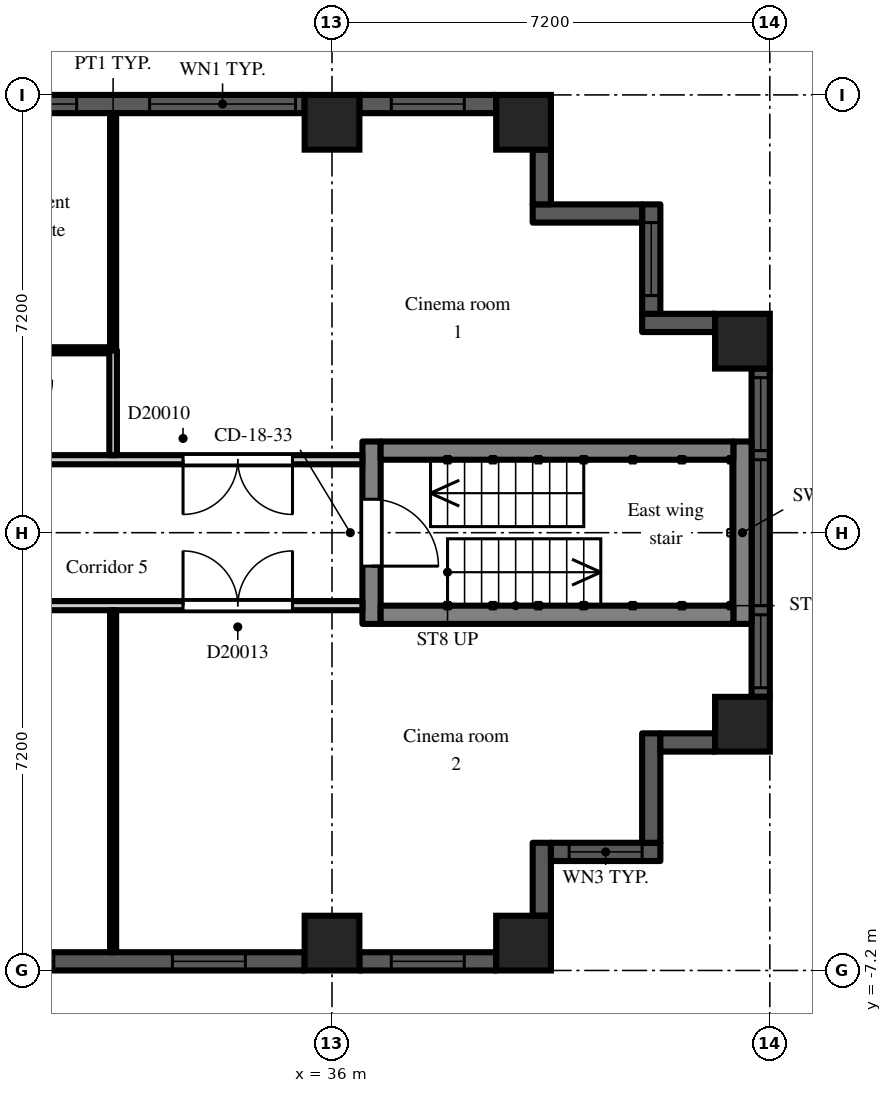
"""IFC4 building model, lengths in metres.
Left out: names, types, materials, properties, quantities, classifications, styles, units other than length and angle.
Written with IfcOpenShell. Run it as: python <this file> out.ifc"""

import sys

from ifc_helpers import new_model, si_unit, direction, frame, frame_2d, origin, origin_2d, place, context, subcontext, project, spatial, rectangle, extrude, element, fill, save


model = new_model("IFC4")
c1 = context("Model", 3, precision=1e-05, world=origin(), true_north=direction((0.0, 1.0)))
c2 = subcontext(c1, "Body", "Model", "MODEL_VIEW")
j1 = project(units=[si_unit("LENGTHUNIT", "METRE"), si_unit("PLANEANGLEUNIT", "RADIAN")], contexts=[c1])
p1 = place(None, origin())
s1 = spatial("IfcSite", under=j1, at=p1, CompositionType="ELEMENT")
p2 = place(p1, origin())
s2 = spatial("IfcBuilding", under=s1, at=p2, CompositionType="ELEMENT")
p3 = place(p2, frame((0.0, 0.0, 138.3)))
s3 = spatial("IfcBuildingStorey", under=s2, at=p3, CompositionType="ELEMENT", Elevation=138.3)
for number, where, z_axis, x_axis in (
    (1, (36.0, -6.75, 0.0), (0.0, 0.0, 1.0), (1.0, 0.0, 0.0)),
    (2, (36.0, 6.75, 0.0), (0.0, 0.0, 1.0), (1.0, 0.0, 0.0)),
    (3, (39.15, -6.75, 0.0), (0.0, 0.0, 1.0), (1.0, 0.0, 0.0)),
    (4, (39.15, 6.75, 0.0), (0.0, 0.0, 1.0), (1.0, 0.0, 0.0)),
    (5, (42.75, -3.15, 0.0), (0.0, 0.0, 1.0), (1.0, 0.0, 0.0)),
    (6, (42.75, 3.15, 0.0), (0.0, 0.0, 1.0), (1.0, 0.0, 0.0)),
):
    element("IfcColumn", number, at=place(p3, frame(where, z_axis=z_axis, x_axis=x_axis)), inside=s3, PredefinedType="COLUMN", context=c2, shape_type="SweptSolid", body=[
        extrude(rectangle(XDim=0.9, YDim=0.9, at=origin_2d()), origin(), (0.0, 0.0, 1.0), 3.0),
    ])
p4 = place(p3, frame((29.25, -7.05, 0.0), z_axis=(0.0, 0.0, 1.0), x_axis=(1.0, 0.0, 0.0)))
e7 = element("IfcWall", 7, at=p4, inside=s3, PredefinedType="SOLIDWALL", context=c2, shape_type="SweptSolid", body=[
    extrude(rectangle(XDim=6.3, YDim=0.3, at=frame_2d((3.15, 0.0))), origin(), (0.0, 0.0, 1.0), 2.2),
])
p5 = place(p4, frame((0.975, 0.0, 0.2)))
e8 = element("IfcOpeningElement", 8, at=p5, cuts=e7, PredefinedType="OPENING", context=c2, shape_type="SweptSolid", body=[
    extrude(rectangle(XDim=1.2, YDim=1.85, at=frame_2d((0.6, 0.925))), frame((0.0, 0.16, 0.0), z_axis=(0.0, -1.0, 0.0), x_axis=(1.0, 0.0, 0.0)), (0.0, 0.0, 1.0), 0.32),
])
p6 = place(p4, frame((4.125, 0.0, 0.2)))
e9 = element("IfcOpeningElement", 9, at=p6, cuts=e7, PredefinedType="OPENING", context=c2, shape_type="SweptSolid", body=[
    extrude(rectangle(XDim=1.2, YDim=1.85, at=frame_2d((0.6, 0.925))), frame((0.0, 0.16, 0.0), z_axis=(0.0, -1.0, 0.0), x_axis=(1.0, 0.0, 0.0)), (0.0, 0.0, 1.0), 0.32),
])
p7 = place(p3, frame((36.45, -7.05, 0.0), z_axis=(0.0, 0.0, 1.0), x_axis=(1.0, 0.0, 0.0)))
e10 = element("IfcWall", 10, at=p7, inside=s3, PredefinedType="SOLIDWALL", context=c2, shape_type="SweptSolid", body=[
    extrude(rectangle(XDim=2.25, YDim=0.3, at=frame_2d((1.125, 0.0))), origin(), (0.0, 0.0, 1.0), 2.2),
])
p8 = place(p7, frame((0.525, 0.0, 0.2)))
e11 = element("IfcOpeningElement", 11, at=p8, cuts=e10, PredefinedType="OPENING", context=c2, shape_type="SweptSolid", body=[
    extrude(rectangle(XDim=1.2, YDim=1.85, at=frame_2d((0.6, 0.925))), frame((0.0, 0.16, 0.0), z_axis=(0.0, -1.0, 0.0), x_axis=(1.0, 0.0, 0.0)), (0.0, 0.0, 1.0), 0.32),
])
p9 = place(p3, frame((39.45, -6.3, 0.0), z_axis=(0.0, 0.0, 1.0), x_axis=(0.0, 1.0, 0.0)))
e12 = element("IfcWall", 12, at=p9, inside=s3, PredefinedType="SOLIDWALL", context=c2, shape_type="SweptSolid", body=[
    extrude(rectangle(XDim=1.2, YDim=0.3, at=frame_2d((0.6, 0.0))), origin(), (0.0, 0.0, 1.0), 2.6),
])
p10 = place(p3, frame((39.6, -5.25, 0.0), z_axis=(0.0, 0.0, 1.0), x_axis=(1.0, 0.0, 0.0)))
e13 = element("IfcWall", 13, at=p10, inside=s3, PredefinedType="SOLIDWALL", context=c2, shape_type="SweptSolid", body=[
    extrude(rectangle(XDim=1.8, YDim=0.3, at=frame_2d((0.9, 0.0))), origin(), (0.0, 0.0, 1.0), 2.6),
])
p11 = place(p10, frame((0.3, 0.0, 0.2)))
e14 = element("IfcOpeningElement", 14, at=p11, cuts=e13, PredefinedType="OPENING", context=c2, shape_type="SweptSolid", body=[
    extrude(rectangle(XDim=1.2, YDim=1.85, at=frame_2d((0.6, 0.925))), frame((0.0, 0.16, 0.0), z_axis=(0.0, -1.0, 0.0), x_axis=(1.0, 0.0, 0.0)), (0.0, 0.0, 1.0), 0.32),
])
p12 = place(p3, frame((41.25, -5.1, 0.0), z_axis=(0.0, 0.0, 1.0), x_axis=(0.0, 1.0, 0.0)))
e15 = element("IfcWall", 15, at=p12, inside=s3, PredefinedType="SOLIDWALL", context=c2, shape_type="SweptSolid", body=[
    extrude(rectangle(XDim=1.8, YDim=0.3, at=frame_2d((0.9, 0.0))), origin(), (0.0, 0.0, 1.0), 2.6),
])
p13 = place(p3, frame((41.4, -3.45, 0.0), z_axis=(0.0, 0.0, 1.0), x_axis=(1.0, 0.0, 0.0)))
e16 = element("IfcWall", 16, at=p13, inside=s3, PredefinedType="SOLIDWALL", context=c2, shape_type="SweptSolid", body=[
    extrude(rectangle(XDim=0.9, YDim=0.3, at=frame_2d((0.45, 0.0))), origin(), (0.0, 0.0, 1.0), 2.6),
])
p14 = place(p3, frame((43.05, -2.7, 0.0), z_axis=(0.0, 0.0, 1.0), x_axis=(0.0, 1.0, 0.0)))
e17 = element("IfcWall", 17, at=p14, inside=s3, PredefinedType="SOLIDWALL", context=c2, shape_type="SweptSolid", body=[
    extrude(rectangle(XDim=5.4, YDim=0.3, at=frame_2d((2.7, 0.0))), origin(), (0.0, 0.0, 1.0), 2.2),
])
p15 = place(p14, frame((1.5, 0.0, 0.2)))
e18 = element("IfcOpeningElement", 18, at=p15, cuts=e17, PredefinedType="OPENING", context=c2, shape_type="SweptSolid", body=[
    extrude(rectangle(XDim=2.4, YDim=1.85, at=frame_2d((1.2, 0.925))), frame((0.0, 0.16, 0.0), z_axis=(0.0, -1.0, 0.0), x_axis=(1.0, 0.0, 0.0)), (0.0, 0.0, 1.0), 0.32),
])
p16 = place(p14, frame((0.15, 0.0, 0.2)))
e19 = element("IfcOpeningElement", 19, at=p16, cuts=e17, PredefinedType="OPENING", context=c2, shape_type="SweptSolid", body=[
    extrude(rectangle(XDim=1.2, YDim=1.85, at=frame_2d((0.6, 0.925))), frame((0.0, 0.16, 0.0), z_axis=(0.0, -1.0, 0.0), x_axis=(1.0, 0.0, 0.0)), (0.0, 0.0, 1.0), 0.32),
])
p17 = place(p14, frame((4.05, 0.0, 0.2)))
e20 = element("IfcOpeningElement", 20, at=p17, cuts=e17, PredefinedType="OPENING", context=c2, shape_type="SweptSolid", body=[
    extrude(rectangle(XDim=1.2, YDim=1.85, at=frame_2d((0.6, 0.925))), frame((0.0, 0.16, 0.0), z_axis=(0.0, -1.0, 0.0), x_axis=(1.0, 0.0, 0.0)), (0.0, 0.0, 1.0), 0.32),
])
p18 = place(p3, frame((42.3, 3.45, 0.0), z_axis=(0.0, 0.0, 1.0), x_axis=(-1.0, 0.0, 0.0)))
e21 = element("IfcWall", 21, at=p18, inside=s3, PredefinedType="SOLIDWALL", context=c2, shape_type="SweptSolid", body=[
    extrude(rectangle(XDim=1.2, YDim=0.3, at=frame_2d((0.6, 0.0))), origin(), (0.0, 0.0, 1.0), 2.6),
])
p19 = place(p3, frame((41.25, 3.6, 0.0), z_axis=(0.0, 0.0, 1.0), x_axis=(0.0, 1.0, 0.0)))
e22 = element("IfcWall", 22, at=p19, inside=s3, PredefinedType="SOLIDWALL", context=c2, shape_type="SweptSolid", body=[
    extrude(rectangle(XDim=1.8, YDim=0.3, at=frame_2d((0.9, 0.0))), origin(), (0.0, 0.0, 1.0), 2.6),
])
p20 = place(p19, frame((0.3, 0.0, 0.2)))
e23 = element("IfcOpeningElement", 23, at=p20, cuts=e22, PredefinedType="OPENING", context=c2, shape_type="SweptSolid", body=[
    extrude(rectangle(XDim=1.2, YDim=1.85, at=frame_2d((0.6, 0.925))), frame((0.0, 0.16, 0.0), z_axis=(0.0, -1.0, 0.0), x_axis=(1.0, 0.0, 0.0)), (0.0, 0.0, 1.0), 0.32),
])
p21 = place(p3, frame((41.1, 5.25, 0.0), z_axis=(0.0, 0.0, 1.0), x_axis=(-1.0, 0.0, 0.0)))
e24 = element("IfcWall", 24, at=p21, inside=s3, PredefinedType="SOLIDWALL", context=c2, shape_type="SweptSolid", body=[
    extrude(rectangle(XDim=1.8, YDim=0.3, at=frame_2d((0.9, 0.0))), origin(), (0.0, 0.0, 1.0), 2.6),
])
p22 = place(p3, frame((39.45, 5.4, 0.0), z_axis=(0.0, 0.0, 1.0), x_axis=(0.0, 1.0, 0.0)))
e25 = element("IfcWall", 25, at=p22, inside=s3, PredefinedType="SOLIDWALL", context=c2, shape_type="SweptSolid", body=[
    extrude(rectangle(XDim=0.9, YDim=0.3, at=frame_2d((0.45, 0.0))), origin(), (0.0, 0.0, 1.0), 2.6),
])
p23 = place(p3, frame((38.7, 7.05, 0.0), z_axis=(0.0, 0.0, 1.0), x_axis=(-1.0, 0.0, 0.0)))
e26 = element("IfcWall", 26, at=p23, inside=s3, PredefinedType="SOLIDWALL", context=c2, shape_type="SweptSolid", body=[
    extrude(rectangle(XDim=2.25, YDim=0.3, at=frame_2d((1.125, 0.0))), origin(), (0.0, 0.0, 1.0), 2.2),
])
p24 = place(p23, frame((0.525, 0.0, 0.2)))
e27 = element("IfcOpeningElement", 27, at=p24, cuts=e26, PredefinedType="OPENING", context=c2, shape_type="SweptSolid", body=[
    extrude(rectangle(XDim=1.2, YDim=1.85, at=frame_2d((0.6, 0.925))), frame((0.0, 0.16, 0.0), z_axis=(0.0, -1.0, 0.0), x_axis=(1.0, 0.0, 0.0)), (0.0, 0.0, 1.0), 0.32),
])
p25 = place(p3, frame((35.55, 7.05, 0.0), z_axis=(0.0, 0.0, 1.0), x_axis=(-1.0, 0.0, 0.0)))
e28 = element("IfcWall", 28, at=p25, inside=s3, PredefinedType="SOLIDWALL", context=c2, shape_type="SweptSolid", body=[
    extrude(rectangle(XDim=6.3, YDim=0.3, at=frame_2d((3.15, 0.0))), origin(), (0.0, 0.0, 1.0), 2.2),
])
p26 = place(p25, frame((0.15, 0.0, 0.2)))
e29 = element("IfcOpeningElement", 29, at=p26, cuts=e28, PredefinedType="OPENING", context=c2, shape_type="SweptSolid", body=[
    extrude(rectangle(XDim=2.4, YDim=1.85, at=frame_2d((1.2, 0.925))), frame((0.0, 0.16, 0.0), z_axis=(0.0, -1.0, 0.0), x_axis=(1.0, 0.0, 0.0)), (0.0, 0.0, 1.0), 0.32),
])
p27 = place(p25, frame((3.75, 0.0, 0.2)))
e30 = element("IfcOpeningElement", 30, at=p27, cuts=e28, PredefinedType="OPENING", context=c2, shape_type="SweptSolid", body=[
    extrude(rectangle(XDim=2.4, YDim=1.85, at=frame_2d((1.2, 0.925))), frame((0.0, 0.16, 0.0), z_axis=(0.0, -1.0, 0.0), x_axis=(1.0, 0.0, 0.0)), (0.0, 0.0, 1.0), 0.32),
])
p28 = place(p3, frame((36.65, -1.5, 0.0), z_axis=(0.0, 0.0, 1.0), x_axis=(0.0, 1.0, 0.0)))
e31 = element("IfcWall", 31, at=p28, inside=s3, PredefinedType="SHEAR", context=c2, shape_type="SweptSolid", body=[
    extrude(rectangle(XDim=3.0, YDim=0.3, at=frame_2d((1.5, 0.0))), origin(), (0.0, 0.0, 1.0), 2.6),
])
p29 = place(p28, frame((0.95, 0.0, 0.0)))
e32 = element("IfcOpeningElement", 32, at=p29, cuts=e31, PredefinedType="OPENING", context=c2, shape_type="SweptSolid", body=[
    extrude(rectangle(XDim=1.1, YDim=2.1, at=frame_2d((0.55, 1.05))), frame((0.0, 0.16, 0.0), z_axis=(0.0, -1.0, 0.0), x_axis=(1.0, 0.0, 0.0)), (0.0, 0.0, 1.0), 0.32),
])
p30 = place(p3, frame((42.75, -1.5, 0.0), z_axis=(0.0, 0.0, 1.0), x_axis=(0.0, 1.0, 0.0)))
e33 = element("IfcWall", 33, at=p30, inside=s3, PredefinedType="SHEAR", context=c2, shape_type="SweptSolid", body=[
    extrude(rectangle(XDim=3.0, YDim=0.3, at=frame_2d((1.5, 0.0))), origin(), (0.0, 0.0, 1.0), 2.6),
])
for number, where, z_axis, x_axis in (
    (34, (36.8, -1.35, 0.0), (0.0, 0.0, 1.0), (1.0, 0.0, 0.0)),
    (35, (36.8, 1.35, 0.0), (0.0, 0.0, 1.0), (1.0, 0.0, 0.0)),
):
    element("IfcWall", number, at=place(p3, frame(where, z_axis=z_axis, x_axis=x_axis)), inside=s3, PredefinedType="SHEAR", context=c2, shape_type="SweptSolid", body=[
        extrude(rectangle(XDim=5.8, YDim=0.3, at=frame_2d((2.9, 0.0))), origin(), (0.0, 0.0, 1.0), 2.6),
    ])
p31 = place(p3, frame((21.6, -1.2, 0.0), z_axis=(0.0, 0.0, 1.0), x_axis=(1.0, 0.0, 0.0)))
e36 = element("IfcWall", 36, at=p31, inside=s3, PredefinedType="PARTITIONING", context=c2, shape_type="SweptSolid", body=[
    extrude(rectangle(XDim=14.9, YDim=0.15, at=frame_2d((7.45, 0.0))), origin(), (0.0, 0.0, 1.0), 2.6),
])
p32 = place(p31, frame((2.7, 0.0, 0.0)))
e37 = element("IfcOpeningElement", 37, at=p32, cuts=e36, PredefinedType="OPENING", context=c2, shape_type="SweptSolid", body=[
    extrude(rectangle(XDim=1.8, YDim=2.1, at=frame_2d((0.9, 1.05))), frame((0.0, 0.085, 0.0), z_axis=(0.0, -1.0, 0.0), x_axis=(1.0, 0.0, 0.0)), (0.0, 0.0, 1.0), 0.17),
])
p33 = place(p31, frame((8.55, 0.0, 0.0)))
e38 = element("IfcOpeningElement", 38, at=p33, cuts=e36, PredefinedType="OPENING", context=c2, shape_type="SweptSolid", body=[
    extrude(rectangle(XDim=0.9, YDim=2.1, at=frame_2d((0.45, 1.05))), frame((0.0, 0.085, 0.0), z_axis=(0.0, -1.0, 0.0), x_axis=(1.0, 0.0, 0.0)), (0.0, 0.0, 1.0), 0.17),
])
p34 = place(p31, frame((11.95, 0.0, 0.0)))
e39 = element("IfcOpeningElement", 39, at=p34, cuts=e36, PredefinedType="OPENING", context=c2, shape_type="SweptSolid", body=[
    extrude(rectangle(XDim=1.8, YDim=2.1, at=frame_2d((0.9, 1.05))), frame((0.0, 0.085, 0.0), z_axis=(0.0, -1.0, 0.0), x_axis=(1.0, 0.0, 0.0)), (0.0, 0.0, 1.0), 0.17),
])
p35 = place(p3, frame((21.6, 1.2, 0.0), z_axis=(0.0, 0.0, 1.0), x_axis=(1.0, 0.0, 0.0)))
e40 = element("IfcWall", 40, at=p35, inside=s3, PredefinedType="PARTITIONING", context=c2, shape_type="SweptSolid", body=[
    extrude(rectangle(XDim=14.9, YDim=0.15, at=frame_2d((7.45, 0.0))), origin(), (0.0, 0.0, 1.0), 2.6),
])
p36 = place(p35, frame((0.45, 0.0, 0.0)))
e41 = element("IfcOpeningElement", 41, at=p36, cuts=e40, PredefinedType="OPENING", context=c2, shape_type="SweptSolid", body=[
    extrude(rectangle(XDim=0.9, YDim=2.1, at=frame_2d((0.45, 1.05))), frame((0.0, 0.085, 0.0), z_axis=(0.0, -1.0, 0.0), x_axis=(1.0, 0.0, 0.0)), (0.0, 0.0, 1.0), 0.17),
])
p37 = place(p35, frame((2.25, 0.0, 0.0)))
e42 = element("IfcOpeningElement", 42, at=p37, cuts=e40, PredefinedType="OPENING", context=c2, shape_type="SweptSolid", body=[
    extrude(rectangle(XDim=0.9, YDim=2.1, at=frame_2d((0.45, 1.05))), frame((0.0, 0.085, 0.0), z_axis=(0.0, -1.0, 0.0), x_axis=(1.0, 0.0, 0.0)), (0.0, 0.0, 1.0), 0.17),
])
p38 = place(p35, frame((4.95, 0.0, 0.0)))
e43 = element("IfcOpeningElement", 43, at=p38, cuts=e40, PredefinedType="OPENING", context=c2, shape_type="SweptSolid", body=[
    extrude(rectangle(XDim=0.9, YDim=2.1, at=frame_2d((0.45, 1.05))), frame((0.0, 0.085, 0.0), z_axis=(0.0, -1.0, 0.0), x_axis=(1.0, 0.0, 0.0)), (0.0, 0.0, 1.0), 0.17),
])
p39 = place(p35, frame((7.8, 0.0, 0.0)))
e44 = element("IfcOpeningElement", 44, at=p39, cuts=e40, PredefinedType="OPENING", context=c2, shape_type="SweptSolid", body=[
    extrude(rectangle(XDim=1.0, YDim=2.1, at=frame_2d((0.5, 1.05))), frame((0.0, 0.085, 0.0), z_axis=(0.0, -1.0, 0.0), x_axis=(1.0, 0.0, 0.0)), (0.0, 0.0, 1.0), 0.17),
])
p40 = place(p35, frame((11.95, 0.0, 0.0)))
e45 = element("IfcOpeningElement", 45, at=p40, cuts=e40, PredefinedType="OPENING", context=c2, shape_type="SweptSolid", body=[
    extrude(rectangle(XDim=1.8, YDim=2.1, at=frame_2d((0.9, 1.05))), frame((0.0, 0.085, 0.0), z_axis=(0.0, -1.0, 0.0), x_axis=(1.0, 0.0, 0.0)), (0.0, 0.0, 1.0), 0.17),
])
p41 = place(p3, frame((30.65, 3.0, 0.0), z_axis=(0.0, 0.0, 1.0), x_axis=(1.0, 0.0, 0.0)))
e46 = element("IfcWall", 46, at=p41, inside=s3, PredefinedType="PARTITIONING", context=c2, shape_type="SweptSolid", body=[
    extrude(rectangle(XDim=1.688, YDim=0.1, at=frame_2d((0.844, 0.0))), origin(), (0.0, 0.0, 1.0), 2.6),
])
p42 = place(p3, frame((32.4, -6.9, 0.0), z_axis=(0.0, 0.0, 1.0), x_axis=(0.0, 1.0, 0.0)))
e47 = element("IfcWall", 47, at=p42, inside=s3, PredefinedType="PARTITIONING", context=c2, shape_type="SweptSolid", body=[
    extrude(rectangle(XDim=5.625, YDim=0.1, at=frame_2d((2.812, 0.0))), origin(), (0.0, 0.0, 1.0), 2.6),
])
p43 = place(p3, frame((32.4, 1.275, 0.0), z_axis=(0.0, 0.0, 1.0), x_axis=(0.0, 1.0, 0.0)))
e48 = element("IfcWall", 48, at=p43, inside=s3, PredefinedType="PARTITIONING", context=c2, shape_type="SweptSolid", body=[
    extrude(rectangle(XDim=1.725, YDim=0.125, at=frame_2d((0.863, 0.0))), origin(), (0.0, 0.0, 1.0), 2.6),
])
p44 = place(p3, frame((32.4, 3.0, 0.0), z_axis=(0.0, 0.0, 1.0), x_axis=(0.0, 1.0, 0.0)))
e49 = element("IfcWall", 49, at=p44, inside=s3, PredefinedType="PARTITIONING", context=c2, shape_type="SweptSolid", body=[
    extrude(rectangle(XDim=3.9, YDim=0.1, at=frame_2d((1.95, 0.0))), origin(), (0.0, 0.0, 1.0), 2.6),
])
p45 = place(p5, origin())
e50 = element("IfcWindow", 50, at=p45, inside=s3, PartitioningType="SINGLE_PANEL", PredefinedType="WINDOW", context=c2, shape_type="SweptSolid", body=[
    extrude(rectangle(XDim=1.2, YDim=1.85, at=frame_2d((0.6, 0.925))), frame((0.0, 0.03, 0.0), z_axis=(0.0, -1.0, 0.0), x_axis=(1.0, 0.0, 0.0)), (0.0, 0.0, 1.0), 0.06),
])
fill(e8, e50)
p46 = place(p6, origin())
e51 = element("IfcWindow", 51, at=p46, inside=s3, PartitioningType="SINGLE_PANEL", PredefinedType="WINDOW", context=c2, shape_type="SweptSolid", body=[
    extrude(rectangle(XDim=1.2, YDim=1.85, at=frame_2d((0.6, 0.925))), frame((0.0, 0.03, 0.0), z_axis=(0.0, -1.0, 0.0), x_axis=(1.0, 0.0, 0.0)), (0.0, 0.0, 1.0), 0.06),
])
fill(e9, e51)
p47 = place(p8, origin())
e52 = element("IfcWindow", 52, at=p47, inside=s3, PartitioningType="SINGLE_PANEL", PredefinedType="WINDOW", context=c2, shape_type="SweptSolid", body=[
    extrude(rectangle(XDim=1.2, YDim=1.85, at=frame_2d((0.6, 0.925))), frame((0.0, 0.03, 0.0), z_axis=(0.0, -1.0, 0.0), x_axis=(1.0, 0.0, 0.0)), (0.0, 0.0, 1.0), 0.06),
])
fill(e11, e52)
p48 = place(p11, origin())
e53 = element("IfcWindow", 53, at=p48, inside=s3, PartitioningType="SINGLE_PANEL", PredefinedType="WINDOW", context=c2, shape_type="SweptSolid", body=[
    extrude(rectangle(XDim=1.2, YDim=1.85, at=frame_2d((0.6, 0.925))), frame((0.0, 0.03, 0.0), z_axis=(0.0, -1.0, 0.0), x_axis=(1.0, 0.0, 0.0)), (0.0, 0.0, 1.0), 0.06),
])
fill(e14, e53)
p49 = place(p15, origin())
e54 = element("IfcWindow", 54, at=p49, inside=s3, PartitioningType="SINGLE_PANEL", PredefinedType="WINDOW", context=c2, shape_type="SweptSolid", body=[
    extrude(rectangle(XDim=2.4, YDim=1.85, at=frame_2d((1.2, 0.925))), frame((0.0, 0.03, 0.0), z_axis=(0.0, -1.0, 0.0), x_axis=(1.0, 0.0, 0.0)), (0.0, 0.0, 1.0), 0.06),
])
fill(e18, e54)
p50 = place(p16, origin())
e55 = element("IfcWindow", 55, at=p50, inside=s3, PartitioningType="SINGLE_PANEL", PredefinedType="WINDOW", context=c2, shape_type="SweptSolid", body=[
    extrude(rectangle(XDim=1.2, YDim=1.85, at=frame_2d((0.6, 0.925))), frame((0.0, 0.03, 0.0), z_axis=(0.0, -1.0, 0.0), x_axis=(1.0, 0.0, 0.0)), (0.0, 0.0, 1.0), 0.06),
])
fill(e19, e55)
p51 = place(p17, origin())
e56 = element("IfcWindow", 56, at=p51, inside=s3, PartitioningType="SINGLE_PANEL", PredefinedType="WINDOW", context=c2, shape_type="SweptSolid", body=[
    extrude(rectangle(XDim=1.2, YDim=1.85, at=frame_2d((0.6, 0.925))), frame((0.0, 0.03, 0.0), z_axis=(0.0, -1.0, 0.0), x_axis=(1.0, 0.0, 0.0)), (0.0, 0.0, 1.0), 0.06),
])
fill(e20, e56)
p52 = place(p20, origin())
e57 = element("IfcWindow", 57, at=p52, inside=s3, PartitioningType="SINGLE_PANEL", PredefinedType="WINDOW", context=c2, shape_type="SweptSolid", body=[
    extrude(rectangle(XDim=1.2, YDim=1.85, at=frame_2d((0.6, 0.925))), frame((0.0, 0.03, 0.0), z_axis=(0.0, -1.0, 0.0), x_axis=(1.0, 0.0, 0.0)), (0.0, 0.0, 1.0), 0.06),
])
fill(e23, e57)
p53 = place(p24, origin())
e58 = element("IfcWindow", 58, at=p53, inside=s3, PartitioningType="SINGLE_PANEL", PredefinedType="WINDOW", context=c2, shape_type="SweptSolid", body=[
    extrude(rectangle(XDim=1.2, YDim=1.85, at=frame_2d((0.6, 0.925))), frame((0.0, 0.03, 0.0), z_axis=(0.0, -1.0, 0.0), x_axis=(1.0, 0.0, 0.0)), (0.0, 0.0, 1.0), 0.06),
])
fill(e27, e58)
p54 = place(p26, origin())
e59 = element("IfcWindow", 59, at=p54, inside=s3, PartitioningType="SINGLE_PANEL", PredefinedType="WINDOW", context=c2, shape_type="SweptSolid", body=[
    extrude(rectangle(XDim=2.4, YDim=1.85, at=frame_2d((1.2, 0.925))), frame((0.0, 0.03, 0.0), z_axis=(0.0, -1.0, 0.0), x_axis=(1.0, 0.0, 0.0)), (0.0, 0.0, 1.0), 0.06),
])
fill(e29, e59)
p55 = place(p27, origin())
e60 = element("IfcWindow", 60, at=p55, inside=s3, PartitioningType="SINGLE_PANEL", PredefinedType="WINDOW", context=c2, shape_type="SweptSolid", body=[
    extrude(rectangle(XDim=2.4, YDim=1.85, at=frame_2d((1.2, 0.925))), frame((0.0, 0.03, 0.0), z_axis=(0.0, -1.0, 0.0), x_axis=(1.0, 0.0, 0.0)), (0.0, 0.0, 1.0), 0.06),
])
fill(e30, e60)
p56 = place(p29, frame((1.1, 0.0, 0.0), z_axis=(0.0, 0.0, 1.0), x_axis=(-1.0, 0.0, 0.0)))
e61 = element("IfcDoor", 61, at=p56, inside=s3, OperationType="SINGLE_SWING_RIGHT", PredefinedType="DOOR", context=c2, shape_type="SweptSolid", body=[
    extrude(rectangle(XDim=1.1, YDim=2.1, at=frame_2d((0.55, 1.05))), frame((0.0, 0.025, 0.0), z_axis=(0.0, -1.0, 0.0), x_axis=(1.0, 0.0, 0.0)), (0.0, 0.0, 1.0), 0.05),
])
fill(e32, e61)
p57 = place(p40, frame((1.8, 0.0, 0.0), z_axis=(0.0, 0.0, 1.0), x_axis=(-1.0, 0.0, 0.0)))
e62 = element("IfcDoor", 62, at=p57, inside=s3, OperationType="DOUBLE_DOOR_DOUBLE_SWING", PredefinedType="DOOR", context=c2, shape_type="SweptSolid", body=[
    extrude(rectangle(XDim=1.8, YDim=2.1, at=frame_2d((0.9, 1.05))), frame((0.0, 0.025, 0.0), z_axis=(0.0, -1.0, 0.0), x_axis=(1.0, 0.0, 0.0)), (0.0, 0.0, 1.0), 0.05),
])
fill(e45, e62)
p58 = place(p34, origin())
e63 = element("IfcDoor", 63, at=p58, inside=s3, OperationType="DOUBLE_DOOR_DOUBLE_SWING", PredefinedType="DOOR", context=c2, shape_type="SweptSolid", body=[
    extrude(rectangle(XDim=1.8, YDim=2.1, at=frame_2d((0.9, 1.05))), frame((0.0, 0.025, 0.0), z_axis=(0.0, -1.0, 0.0), x_axis=(1.0, 0.0, 0.0)), (0.0, 0.0, 1.0), 0.05),
])
fill(e39, e63)
save(model, sys.argv[1])
